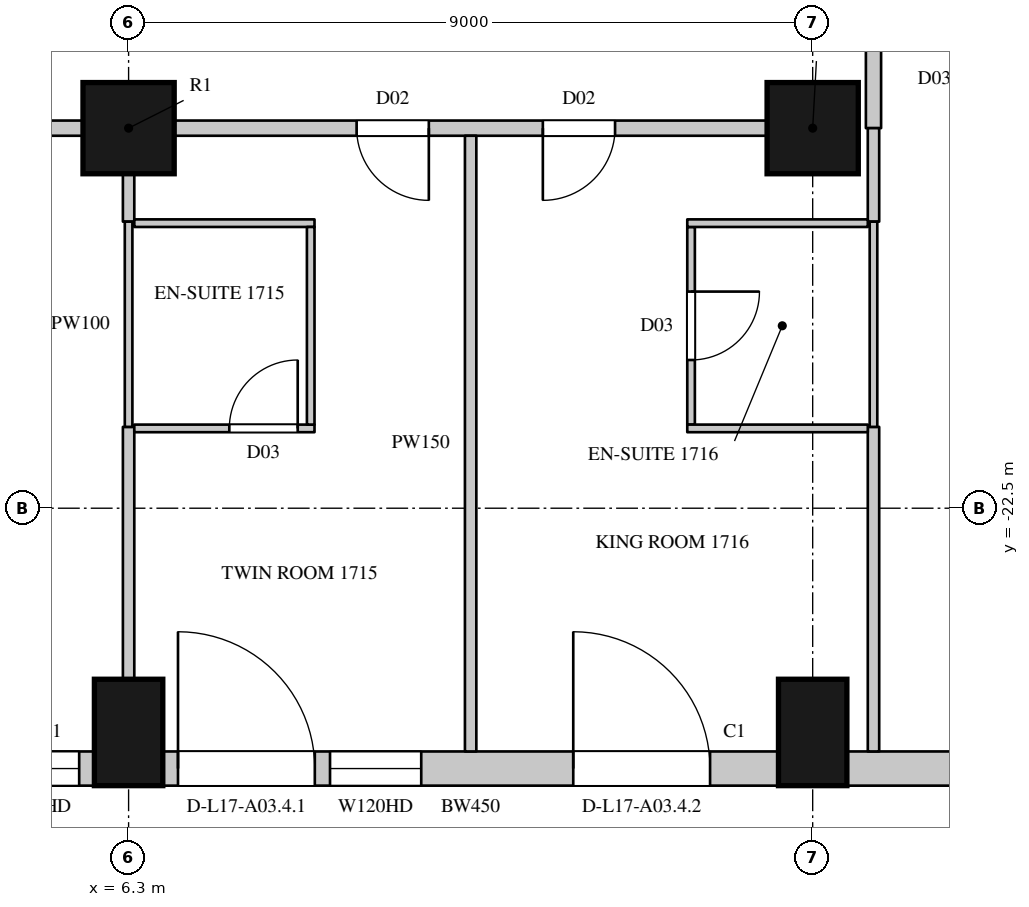
"""IFC4 building model, lengths in metres.
Left out: names, types, materials, properties, quantities, classifications, styles, units other than length and angle.
Written with IfcOpenShell. Run it as: python <this file> out.ifc"""

import sys

from ifc_helpers import new_model, si_unit, direction, frame, frame_2d, origin, origin_2d, place, context, subcontext, project, spatial, rectangle, circle, extrude, element, fill, save


model = new_model("IFC4")
c1 = context("Model", 3, precision=1e-05, world=origin(), true_north=direction((0.0, 1.0)))
c2 = subcontext(c1, "Body", "Model", "MODEL_VIEW")
j1 = project(units=[si_unit("LENGTHUNIT", "METRE"), si_unit("PLANEANGLEUNIT", "RADIAN")], contexts=[c1])
p1 = place(None, origin())
s1 = spatial("IfcSite", under=j1, at=p1, CompositionType="ELEMENT")
p2 = place(p1, origin())
s2 = spatial("IfcBuilding", under=s1, at=p2, CompositionType="ELEMENT")
p3 = place(p2, frame((0.0, 0.0, 91.5)))
s3 = spatial("IfcBuildingStorey", under=s2, at=p3, CompositionType="ELEMENT", Elevation=91.5)
for number, where, z_axis, x_axis in (
    (1, (6.3, -25.45, 0.0), (0.0, 0.0, 1.0), (1.0, 0.0, 0.0)),
    (2, (15.3, -25.45, 0.0), (0.0, 0.0, 1.0), (1.0, 0.0, 0.0)),
):
    element("IfcColumn", number, at=place(p3, frame(where, z_axis=z_axis, x_axis=x_axis)), inside=s3, PredefinedType="COLUMN", context=c2, shape_type="SweptSolid", body=[
        extrude(rectangle(XDim=0.9, YDim=1.4, at=origin_2d()), origin(), (0.0, 0.0, 1.0), 3.6),
    ])
for number, where, z_axis, x_axis in (
    (3, (6.3, -17.5, 0.0), (0.0, 0.0, 1.0), (1.0, 0.0, 0.0)),
    (4, (15.3, -17.5, 0.0), (0.0, 0.0, 1.0), (1.0, 0.0, 0.0)),
):
    element("IfcColumn", number, at=place(p3, frame(where, z_axis=z_axis, x_axis=x_axis)), inside=s3, PredefinedType="COLUMN", context=c2, shape_type="SweptSolid", body=[
        extrude(circle(Radius=0.6, at=origin_2d()), origin(), (0.0, 0.0, 1.0), 3.6),
    ])
p4 = place(p3, frame((-2.25, -25.925, 0.0), z_axis=(0.0, 0.0, 1.0), x_axis=(1.0, 0.0, 0.0)))
e5 = element("IfcWall", 5, at=p4, inside=s3, PredefinedType="SOLIDWALL", context=c2, shape_type="SweptSolid", body=[
    extrude(rectangle(XDim=8.1, YDim=0.45, at=frame_2d((4.05, 0.0))), origin(), (0.0, 0.0, 1.0), 3.3),
])
p5 = place(p4, frame((0.2, 0.0, 0.0)))
e6 = element("IfcOpeningElement", 6, at=p5, cuts=e5, PredefinedType="OPENING", context=c2, shape_type="SweptSolid", body=[
    extrude(rectangle(XDim=1.8, YDim=2.4, at=frame_2d((0.9, 1.2))), frame((0.0, 0.235, 0.0), z_axis=(0.0, -1.0, 0.0), x_axis=(1.0, 0.0, 0.0)), (0.0, 0.0, 1.0), 0.47),
])
p6 = place(p4, frame((2.2, 0.0, 1.05)))
e7 = element("IfcOpeningElement", 7, at=p6, cuts=e5, PredefinedType="OPENING", context=c2, shape_type="SweptSolid", body=[
    extrude(rectangle(XDim=1.2, YDim=2.0, at=frame_2d((0.6, 1.0))), frame((0.0, 0.235, 0.0), z_axis=(0.0, -1.0, 0.0), x_axis=(1.0, 0.0, 0.0)), (0.0, 0.0, 1.0), 0.47),
])
p7 = place(p4, frame((4.7, 0.0, 0.0)))
e8 = element("IfcOpeningElement", 8, at=p7, cuts=e5, PredefinedType="OPENING", context=c2, shape_type="SweptSolid", body=[
    extrude(rectangle(XDim=1.8, YDim=2.4, at=frame_2d((0.9, 1.2))), frame((0.0, 0.235, 0.0), z_axis=(0.0, -1.0, 0.0), x_axis=(1.0, 0.0, 0.0)), (0.0, 0.0, 1.0), 0.47),
])
p8 = place(p4, frame((6.7, 0.0, 1.05)))
e9 = element("IfcOpeningElement", 9, at=p8, cuts=e5, PredefinedType="OPENING", context=c2, shape_type="SweptSolid", body=[
    extrude(rectangle(XDim=1.2, YDim=2.0, at=frame_2d((0.6, 1.0))), frame((0.0, 0.235, 0.0), z_axis=(0.0, -1.0, 0.0), x_axis=(1.0, 0.0, 0.0)), (0.0, 0.0, 1.0), 0.47),
])
p9 = place(p3, frame((6.75, -25.925, 0.0), z_axis=(0.0, 0.0, 1.0), x_axis=(1.0, 0.0, 0.0)))
e10 = element("IfcWall", 10, at=p9, inside=s3, PredefinedType="SOLIDWALL", context=c2, shape_type="SweptSolid", body=[
    extrude(rectangle(XDim=8.1, YDim=0.45, at=frame_2d((4.05, 0.0))), origin(), (0.0, 0.0, 1.0), 3.3),
])
p10 = place(p9, frame((0.2, 0.0, 0.0)))
e11 = element("IfcOpeningElement", 11, at=p10, cuts=e10, PredefinedType="OPENING", context=c2, shape_type="SweptSolid", body=[
    extrude(rectangle(XDim=1.8, YDim=2.4, at=frame_2d((0.9, 1.2))), frame((0.0, 0.235, 0.0), z_axis=(0.0, -1.0, 0.0), x_axis=(1.0, 0.0, 0.0)), (0.0, 0.0, 1.0), 0.47),
])
p11 = place(p9, frame((2.2, 0.0, 1.05)))
e12 = element("IfcOpeningElement", 12, at=p11, cuts=e10, PredefinedType="OPENING", context=c2, shape_type="SweptSolid", body=[
    extrude(rectangle(XDim=1.2, YDim=2.0, at=frame_2d((0.6, 1.0))), frame((0.0, 0.235, 0.0), z_axis=(0.0, -1.0, 0.0), x_axis=(1.0, 0.0, 0.0)), (0.0, 0.0, 1.0), 0.47),
])
p12 = place(p9, frame((5.4, 0.0, 0.0)))
e13 = element("IfcOpeningElement", 13, at=p12, cuts=e10, PredefinedType="OPENING", context=c2, shape_type="SweptSolid", body=[
    extrude(rectangle(XDim=1.8, YDim=2.4, at=frame_2d((0.9, 1.2))), frame((0.0, 0.235, 0.0), z_axis=(0.0, -1.0, 0.0), x_axis=(1.0, 0.0, 0.0)), (0.0, 0.0, 1.0), 0.47),
])
p13 = place(p3, frame((15.75, -25.925, 0.0), z_axis=(0.0, 0.0, 1.0), x_axis=(1.0, 0.0, 0.0)))
e14 = element("IfcWall", 14, at=p13, inside=s3, PredefinedType="SOLIDWALL", context=c2, shape_type="SweptSolid", body=[
    extrude(rectangle(XDim=2.914, YDim=0.45, at=frame_2d((1.457, 0.0))), origin(), (0.0, 0.0, 1.0), 3.3),
])
p14 = place(p3, frame((-2.1, -17.5, 0.0), z_axis=(0.0, 0.0, 1.0), x_axis=(1.0, 0.0, 0.0)))
e15 = element("IfcWall", 15, at=p14, inside=s3, PredefinedType="PARTITIONING", context=c2, shape_type="SweptSolid", body=[
    extrude(rectangle(XDim=7.8, YDim=0.2, at=frame_2d((3.9, 0.0))), origin(), (0.0, 0.0, 1.0), 2.75),
])
p15 = place(p14, frame((4.15, 0.0, 0.0)))
e16 = element("IfcOpeningElement", 16, at=p15, cuts=e15, PredefinedType="OPENING", context=c2, shape_type="SweptSolid", body=[
    extrude(rectangle(XDim=0.95, YDim=2.2, at=frame_2d((0.475, 1.1))), frame((0.0, 0.11, 0.0), z_axis=(0.0, -1.0, 0.0), x_axis=(1.0, 0.0, 0.0)), (0.0, 0.0, 1.0), 0.22),
])
p16 = place(p3, frame((6.9, -17.5, 0.0), z_axis=(0.0, 0.0, 1.0), x_axis=(1.0, 0.0, 0.0)))
e17 = element("IfcWall", 17, at=p16, inside=s3, PredefinedType="PARTITIONING", context=c2, shape_type="SweptSolid", body=[
    extrude(rectangle(XDim=7.8, YDim=0.2, at=frame_2d((3.9, 0.0))), origin(), (0.0, 0.0, 1.0), 2.75),
])
p17 = place(p16, frame((2.4, 0.0, 0.0)))
e18 = element("IfcOpeningElement", 18, at=p17, cuts=e17, PredefinedType="OPENING", context=c2, shape_type="SweptSolid", body=[
    extrude(rectangle(XDim=0.95, YDim=2.2, at=frame_2d((0.475, 1.1))), frame((0.0, 0.11, 0.0), z_axis=(0.0, -1.0, 0.0), x_axis=(1.0, 0.0, 0.0)), (0.0, 0.0, 1.0), 0.22),
])
p18 = place(p16, frame((4.85, 0.0, 0.0)))
e19 = element("IfcOpeningElement", 19, at=p18, cuts=e17, PredefinedType="OPENING", context=c2, shape_type="SweptSolid", body=[
    extrude(rectangle(XDim=0.95, YDim=2.2, at=frame_2d((0.475, 1.1))), frame((0.0, 0.11, 0.0), z_axis=(0.0, -1.0, 0.0), x_axis=(1.0, 0.0, 0.0)), (0.0, 0.0, 1.0), 0.22),
])
p19 = place(p3, frame((16.1, -17.5, 0.0), z_axis=(0.0, 0.0, 1.0), x_axis=(0.0, 1.0, 0.0)))
e20 = element("IfcWall", 20, at=p19, inside=s3, PredefinedType="PARTITIONING", context=c2, shape_type="SweptSolid", body=[
    extrude(rectangle(XDim=12.75, YDim=0.2, at=frame_2d((6.375, 0.0))), origin(), (0.0, 0.0, 1.0), 3.3),
])
p20 = place(p19, frame((2.75, 0.0, 0.0)))
e21 = element("IfcOpeningElement", 21, at=p20, cuts=e20, PredefinedType="OPENING", context=c2, shape_type="SweptSolid", body=[
    extrude(rectangle(XDim=0.95, YDim=2.2, at=frame_2d((0.475, 1.1))), frame((0.0, 0.11, 0.0), z_axis=(0.0, -1.0, 0.0), x_axis=(1.0, 0.0, 0.0)), (0.0, 0.0, 1.0), 0.22),
])
p21 = place(p19, frame((6.95, 0.0, 0.0)))
e22 = element("IfcOpeningElement", 22, at=p21, cuts=e20, PredefinedType="OPENING", context=c2, shape_type="SweptSolid", body=[
    extrude(rectangle(XDim=0.95, YDim=2.2, at=frame_2d((0.475, 1.1))), frame((0.0, 0.11, 0.0), z_axis=(0.0, -1.0, 0.0), x_axis=(1.0, 0.0, 0.0)), (0.0, 0.0, 1.0), 0.22),
])
p22 = place(p19, frame((11.4, 0.0, 0.0)))
e23 = element("IfcOpeningElement", 23, at=p22, cuts=e20, PredefinedType="OPENING", context=c2, shape_type="SweptSolid", body=[
    extrude(rectangle(XDim=0.95, YDim=2.2, at=frame_2d((0.475, 1.1))), frame((0.0, 0.11, 0.0), z_axis=(0.0, -1.0, 0.0), x_axis=(1.0, 0.0, 0.0)), (0.0, 0.0, 1.0), 0.22),
])
p23 = place(p3, frame((6.3, -24.75, 0.0), z_axis=(0.0, 0.0, 1.0), x_axis=(0.0, 1.0, 0.0)))
e24 = element("IfcWall", 24, at=p23, inside=s3, PredefinedType="PARTITIONING", context=c2, shape_type="SweptSolid", body=[
    extrude(rectangle(XDim=3.32, YDim=0.15, at=frame_2d((1.66, 0.0))), origin(), (0.0, 0.0, 1.0), 2.75),
])
p24 = place(p3, frame((6.3, -18.73, 0.0), z_axis=(0.0, 0.0, 1.0), x_axis=(0.0, 1.0, 0.0)))
e25 = element("IfcWall", 25, at=p24, inside=s3, PredefinedType="PARTITIONING", context=c2, shape_type="SweptSolid", body=[
    extrude(rectangle(XDim=0.63, YDim=0.15, at=frame_2d((0.315, 0.0))), origin(), (0.0, 0.0, 1.0), 2.75),
])
p25 = place(p3, frame((10.8, -25.7, 0.0), z_axis=(0.0, 0.0, 1.0), x_axis=(0.0, 1.0, 0.0)))
e26 = element("IfcWall", 26, at=p25, inside=s3, PredefinedType="PARTITIONING", context=c2, shape_type="SweptSolid", body=[
    extrude(rectangle(XDim=8.1, YDim=0.15, at=frame_2d((4.05, 0.0))), origin(), (0.0, 0.0, 1.0), 2.65),
])
p26 = place(p3, frame((16.1, -25.7, 0.0), z_axis=(0.0, 0.0, 1.0), x_axis=(0.0, 1.0, 0.0)))
e27 = element("IfcWall", 27, at=p26, inside=s3, PredefinedType="PARTITIONING", context=c2, shape_type="SweptSolid", body=[
    extrude(rectangle(XDim=4.27, YDim=0.15, at=frame_2d((2.135, 0.0))), origin(), (0.0, 0.0, 1.0), 3.3),
])
p27 = place(p3, frame((16.1, -18.73, 0.0), z_axis=(0.0, 0.0, 1.0), x_axis=(0.0, 1.0, 0.0)))
e28 = element("IfcWall", 28, at=p27, inside=s3, PredefinedType="PARTITIONING", context=c2, shape_type="SweptSolid", body=[
    extrude(rectangle(XDim=1.23, YDim=0.15, at=frame_2d((0.615, 0.0))), origin(), (0.0, 0.0, 1.0), 3.3),
])
p28 = place(p3, frame((6.3, -21.43, 0.0), z_axis=(0.0, 0.0, 1.0), x_axis=(0.0, 1.0, 0.0)))
e29 = element("IfcWall", 29, at=p28, inside=s3, PredefinedType="PARTITIONING", context=c2, shape_type="SweptSolid", body=[
    extrude(rectangle(XDim=2.7, YDim=0.1, at=frame_2d((1.35, 0.0))), origin(), (0.0, 0.0, 1.0), 2.75),
])
p29 = place(p3, frame((6.375, -21.45, 0.0), z_axis=(0.0, 0.0, 1.0), x_axis=(1.0, 0.0, 0.0)))
e30 = element("IfcWall", 30, at=p29, inside=s3, PredefinedType="PARTITIONING", context=c2, shape_type="SweptSolid", body=[
    extrude(rectangle(XDim=2.371, YDim=0.1, at=frame_2d((1.186, 0.0))), origin(), (0.0, 0.0, 1.0), 3.3),
])
p30 = place(p29, frame((1.25, 0.0, 0.0)))
e31 = element("IfcOpeningElement", 31, at=p30, cuts=e30, PredefinedType="OPENING", context=c2, shape_type="SweptSolid", body=[
    extrude(rectangle(XDim=0.9, YDim=2.2, at=frame_2d((0.45, 1.1))), frame((0.0, 0.06, 0.0), z_axis=(0.0, -1.0, 0.0), x_axis=(1.0, 0.0, 0.0)), (0.0, 0.0, 1.0), 0.12),
])
p31 = place(p3, frame((6.375, -18.75, 0.0), z_axis=(0.0, 0.0, 1.0), x_axis=(1.0, 0.0, 0.0)))
e32 = element("IfcWall", 32, at=p31, inside=s3, PredefinedType="PARTITIONING", context=c2, shape_type="SweptSolid", body=[
    extrude(rectangle(XDim=2.371, YDim=0.1, at=frame_2d((1.186, 0.0))), origin(), (0.0, 0.0, 1.0), 3.3),
])
p32 = place(p3, frame((8.696, -21.4, 0.0), z_axis=(0.0, 0.0, 1.0), x_axis=(0.0, 1.0, 0.0)))
e33 = element("IfcWall", 33, at=p32, inside=s3, PredefinedType="PARTITIONING", context=c2, shape_type="SweptSolid", body=[
    extrude(rectangle(XDim=2.6, YDim=0.1, at=frame_2d((1.3, 0.0))), origin(), (0.0, 0.0, 1.0), 3.3),
])
p33 = place(p3, frame((13.7, -21.4, 0.0), z_axis=(0.0, 0.0, 1.0), x_axis=(0.0, 1.0, 0.0)))
e34 = element("IfcWall", 34, at=p33, inside=s3, PredefinedType="PARTITIONING", context=c2, shape_type="SweptSolid", body=[
    extrude(rectangle(XDim=2.6, YDim=0.1, at=frame_2d((1.3, 0.0))), origin(), (0.0, 0.0, 1.0), 3.3),
])
p34 = place(p33, frame((0.85, 0.0, 0.0)))
e35 = element("IfcOpeningElement", 35, at=p34, cuts=e34, PredefinedType="OPENING", context=c2, shape_type="SweptSolid", body=[
    extrude(rectangle(XDim=0.9, YDim=2.2, at=frame_2d((0.45, 1.1))), frame((0.0, 0.06, 0.0), z_axis=(0.0, -1.0, 0.0), x_axis=(1.0, 0.0, 0.0)), (0.0, 0.0, 1.0), 0.12),
])
for number, where, z_axis, x_axis in (
    (36, (13.65, -21.45, 0.0), (0.0, 0.0, 1.0), (1.0, 0.0, 0.0)),
    (37, (13.65, -18.75, 0.0), (0.0, 0.0, 1.0), (1.0, 0.0, 0.0)),
):
    element("IfcWall", number, at=place(p3, frame(where, z_axis=z_axis, x_axis=x_axis)), inside=s3, PredefinedType="PARTITIONING", context=c2, shape_type="SweptSolid", body=[
        extrude(rectangle(XDim=2.375, YDim=0.1, at=frame_2d((1.188, 0.0))), origin(), (0.0, 0.0, 1.0), 3.3),
    ])
p35 = place(p3, frame((16.1, -21.43, 0.0), z_axis=(0.0, 0.0, 1.0), x_axis=(0.0, 1.0, 0.0)))
e38 = element("IfcWall", 38, at=p35, inside=s3, PredefinedType="PARTITIONING", context=c2, shape_type="SweptSolid", body=[
    extrude(rectangle(XDim=2.7, YDim=0.1, at=frame_2d((1.35, 0.0))), origin(), (0.0, 0.0, 1.0), 3.3),
])
p36 = place(p8, origin())
e39 = element("IfcWindow", 39, at=p36, inside=s3, PartitioningType="SINGLE_PANEL", PredefinedType="WINDOW", context=c2, shape_type="SweptSolid", body=[
    extrude(rectangle(XDim=1.2, YDim=2.0, at=frame_2d((0.6, 1.0))), frame((0.0, 0.135, 0.0), z_axis=(0.0, -1.0, 0.0), x_axis=(1.0, 0.0, 0.0)), (0.0, 0.0, 1.0), 0.06),
])
fill(e9, e39)
p37 = place(p10, origin())
e40 = element("IfcDoor", 40, at=p37, inside=s3, OperationType="SLIDING_TO_LEFT", PredefinedType="DOOR", context=c2, shape_type="SweptSolid", body=[
    extrude(rectangle(XDim=1.8, YDim=2.4, at=frame_2d((0.9, 1.2))), frame((0.0, 0.13, 0.0), z_axis=(0.0, -1.0, 0.0), x_axis=(1.0, 0.0, 0.0)), (0.0, 0.0, 1.0), 0.05),
])
fill(e11, e40)
p38 = place(p11, origin())
e41 = element("IfcWindow", 41, at=p38, inside=s3, PartitioningType="SINGLE_PANEL", PredefinedType="WINDOW", context=c2, shape_type="SweptSolid", body=[
    extrude(rectangle(XDim=1.2, YDim=2.0, at=frame_2d((0.6, 1.0))), frame((0.0, 0.135, 0.0), z_axis=(0.0, -1.0, 0.0), x_axis=(1.0, 0.0, 0.0)), (0.0, 0.0, 1.0), 0.06),
])
fill(e12, e41)
p39 = place(p12, origin())
e42 = element("IfcDoor", 42, at=p39, inside=s3, OperationType="SLIDING_TO_LEFT", PredefinedType="DOOR", context=c2, shape_type="SweptSolid", body=[
    extrude(rectangle(XDim=1.8, YDim=2.4, at=frame_2d((0.9, 1.2))), frame((0.0, 0.13, 0.0), z_axis=(0.0, -1.0, 0.0), x_axis=(1.0, 0.0, 0.0)), (0.0, 0.0, 1.0), 0.05),
])
fill(e13, e42)
p40 = place(p17, origin())
e43 = element("IfcDoor", 43, at=p40, inside=s3, OperationType="SINGLE_SWING_LEFT", PredefinedType="DOOR", context=c2, shape_type="SweptSolid", body=[
    extrude(rectangle(XDim=0.95, YDim=2.2, at=frame_2d((0.475, 1.1))), frame((0.0, 0.025, 0.0), z_axis=(0.0, -1.0, 0.0), x_axis=(1.0, 0.0, 0.0)), (0.0, 0.0, 1.0), 0.05),
])
fill(e18, e43)
p41 = place(p30, origin())
e44 = element("IfcDoor", 44, at=p41, inside=s3, OperationType="SINGLE_SWING_RIGHT", PredefinedType="DOOR", context=c2, shape_type="SweptSolid", body=[
    extrude(rectangle(XDim=0.9, YDim=2.2, at=frame_2d((0.45, 1.1))), frame((0.0, 0.025, 0.0), z_axis=(0.0, -1.0, 0.0), x_axis=(1.0, 0.0, 0.0)), (0.0, 0.0, 1.0), 0.05),
])
fill(e31, e44)
p42 = place(p18, origin())
e45 = element("IfcDoor", 45, at=p42, inside=s3, OperationType="SINGLE_SWING_RIGHT", PredefinedType="DOOR", context=c2, shape_type="SweptSolid", body=[
    extrude(rectangle(XDim=0.95, YDim=2.2, at=frame_2d((0.475, 1.1))), frame((0.0, 0.025, 0.0), z_axis=(0.0, -1.0, 0.0), x_axis=(1.0, 0.0, 0.0)), (0.0, 0.0, 1.0), 0.05),
])
fill(e19, e45)
p43 = place(p34, origin())
e46 = element("IfcDoor", 46, at=p43, inside=s3, OperationType="SINGLE_SWING_LEFT", PredefinedType="DOOR", context=c2, shape_type="SweptSolid", body=[
    extrude(rectangle(XDim=0.9, YDim=2.2, at=frame_2d((0.45, 1.1))), frame((0.0, 0.025, 0.0), z_axis=(0.0, -1.0, 0.0), x_axis=(1.0, 0.0, 0.0)), (0.0, 0.0, 1.0), 0.05),
])
fill(e35, e46)
save(model, sys.argv[1])
